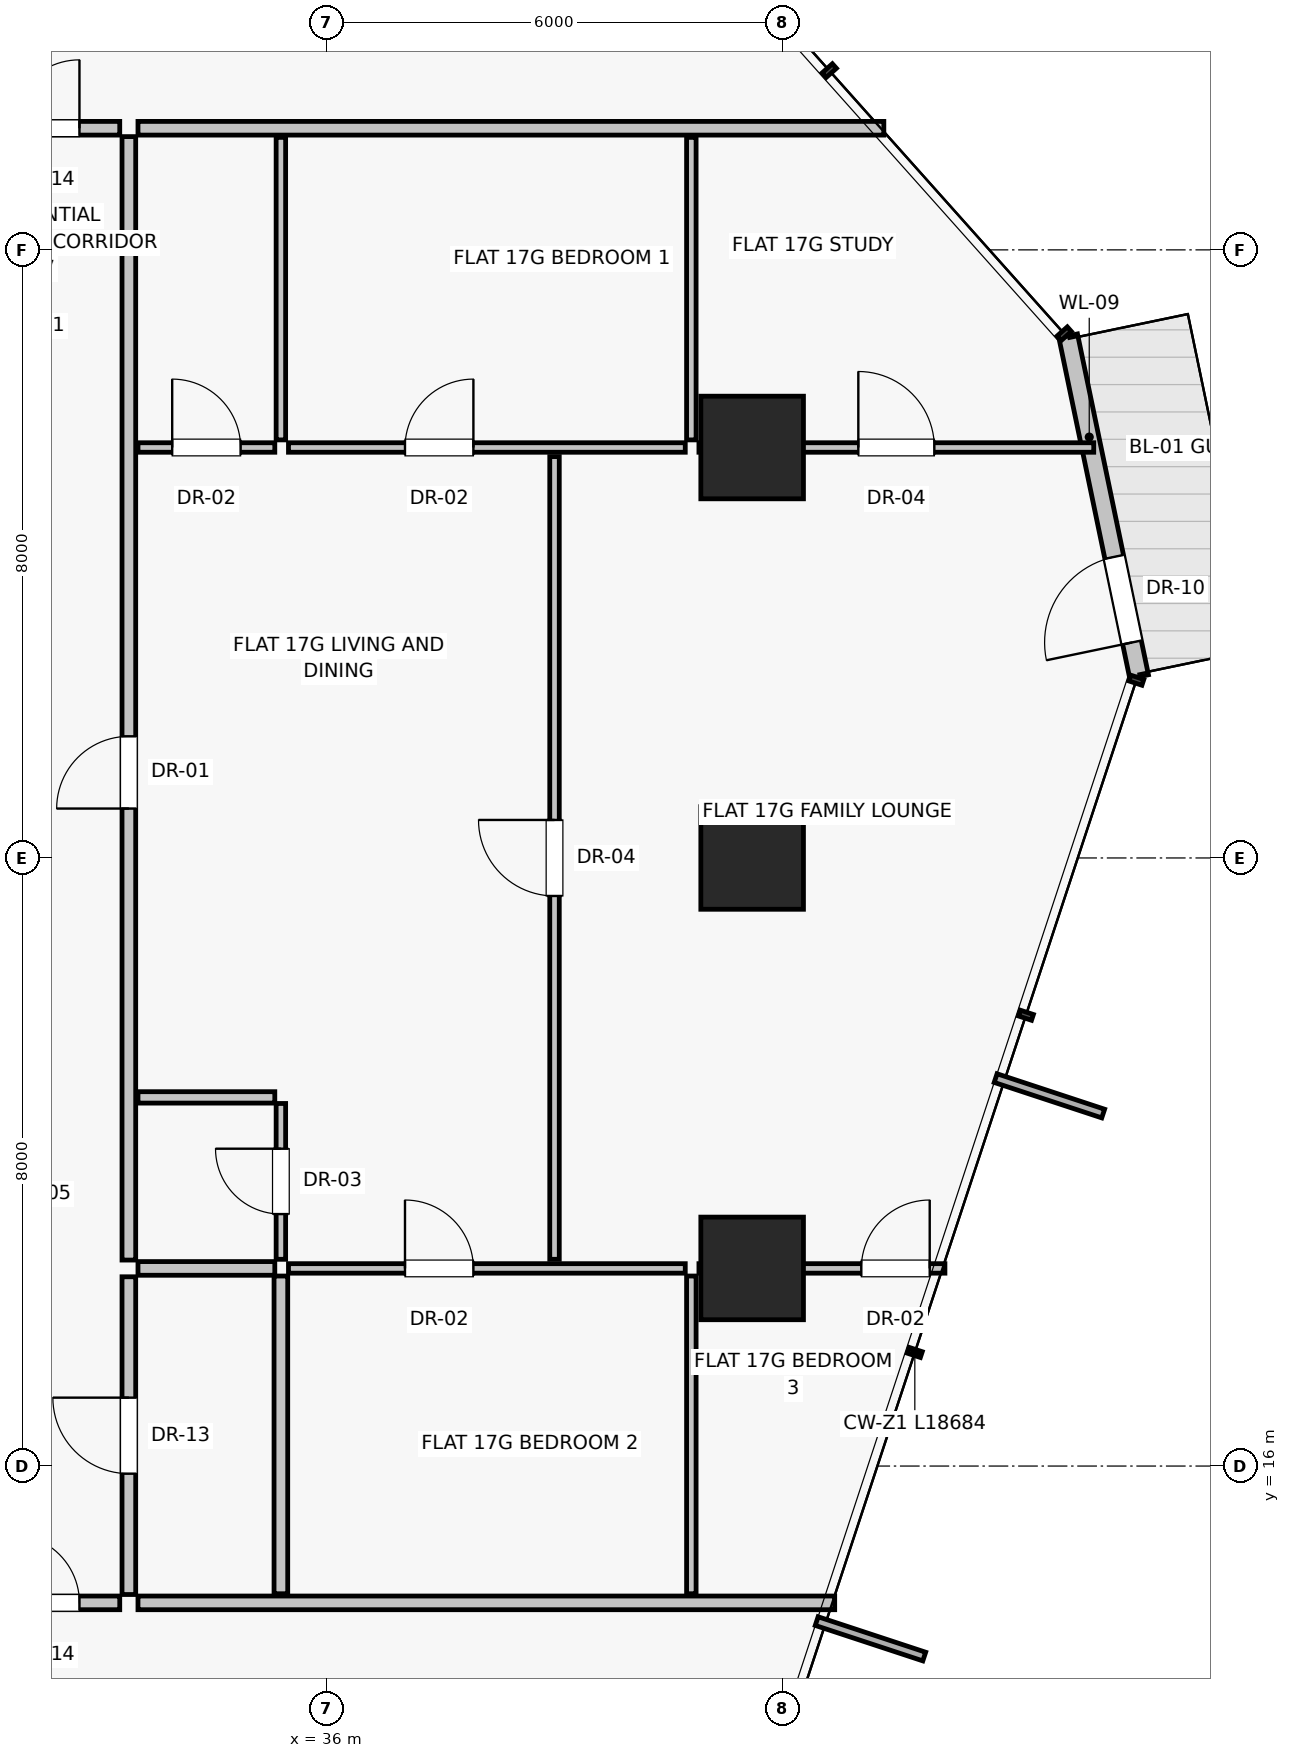
"""IFC4 building model, lengths in metres.
Left out: names, types, materials, properties, quantities, classifications, styles, units other than length and angle.
Written with IfcOpenShell. Run it as: python <this file> out.ifc"""

import sys

from ifc_helpers import new_model, si_unit, direction, frame, frame_2d, origin, origin_2d, place, context, subcontext, project, spatial, rectangle, extrude, source, transform, mapped, element, fill, save


model = new_model("IFC4")
c1 = context("Model", 3, precision=1e-05, world=origin(), true_north=direction((0.0, 1.0)))
c2 = subcontext(c1, "Body", "Model", "MODEL_VIEW")
j1 = project(units=[si_unit("LENGTHUNIT", "METRE"), si_unit("PLANEANGLEUNIT", "RADIAN")], contexts=[c1])
p1 = place(None, origin())
s1 = spatial("IfcSite", under=j1, at=p1, CompositionType="ELEMENT")
p2 = place(p1, origin())
s2 = spatial("IfcBuilding", under=s1, at=p2, CompositionType="ELEMENT")
p3 = place(p2, frame((0.0, 0.0, 64.1)))
s3 = spatial("IfcBuildingStorey", under=s2, at=p3, CompositionType="ELEMENT", Elevation=64.1)
for number, where, z_axis, x_axis in (
    (1, (41.6, 18.6, 0.0), (0.0, 0.0, 1.0), (1.0, 0.0, 0.0)),
    (2, (41.6, 24.0, 0.0), (0.0, 0.0, 1.0), (1.0, 0.0, 0.0)),
    (3, (41.6, 29.4, 0.0), (0.0, 0.0, 1.0), (1.0, 0.0, 0.0)),
):
    element("IfcColumn", number, at=place(p3, frame(where, z_axis=z_axis, x_axis=x_axis)), inside=s3, PredefinedType="COLUMN", context=c2, shape_type="SweptSolid", body=[
        extrude(rectangle(XDim=1.35, YDim=1.35, at=origin_2d()), origin(), (0.0, 0.0, 1.0), 3.25),
    ])
p4 = place(p3, frame((46.691, 26.385, 0.0), z_axis=(0.0, 0.0, 1.0), x_axis=(-0.203788213697, 0.979014996799, 0.0)))
e4 = element("IfcWall", 4, at=p4, inside=s3, PredefinedType="SOLIDWALL", context=c2, shape_type="SweptSolid", body=[
    extrude(rectangle(XDim=4.58, YDim=0.25, at=frame_2d((2.29, 0.0))), origin(), (0.0, 0.0, 1.0), 3.0),
])
p5 = place(p4, frame((0.46, 0.0, 0.0)))
e5 = element("IfcOpeningElement", 5, at=p5, cuts=e4, PredefinedType="OPENING", context=c2, shape_type="SweptSolid", body=[
    extrude(rectangle(XDim=1.15, YDim=2.25, at=frame_2d((0.575, 1.125))), frame((0.0, 0.135, 0.0), z_axis=(0.0, -1.0, 0.0), x_axis=(1.0, 0.0, 0.0)), (0.0, 0.0, 1.0), 0.27),
])
p6 = place(p3, frame((33.52, 14.2, 0.0), z_axis=(0.0, 0.0, 1.0), x_axis=(1.0, 0.0, 0.0)))
e6 = element("IfcWall", 6, at=p6, inside=s3, PredefinedType="PARTITIONING", context=c2, shape_type="SweptSolid", body=[
    extrude(rectangle(XDim=9.166, YDim=0.18, at=frame_2d((4.583, 0.0))), origin(), (0.0, 0.0, 1.0), 3.0),
])
p7 = place(p3, frame((33.52, 33.6, 0.0), z_axis=(0.0, 0.0, 1.0), x_axis=(1.0, 0.0, 0.0)))
e7 = element("IfcWall", 7, at=p7, inside=s3, PredefinedType="PARTITIONING", context=c2, shape_type="SweptSolid", body=[
    extrude(rectangle(XDim=9.812, YDim=0.18, at=frame_2d((4.906, 0.0))), origin(), (0.0, 0.0, 1.0), 3.0),
])
p8 = place(p3, frame((33.4, 14.31, 0.0), z_axis=(0.0, 0.0, 1.0), x_axis=(0.0, 1.0, 0.0)))
e8 = element("IfcWall", 8, at=p8, inside=s3, PredefinedType="PARTITIONING", context=c2, shape_type="SweptSolid", body=[
    extrude(rectangle(XDim=4.18, YDim=0.18, at=frame_2d((2.09, 0.0))), origin(), (0.0, 0.0, 1.0), 3.0),
])
p9 = place(p8, frame((1.59, 0.0, 0.0)))
e9 = element("IfcOpeningElement", 9, at=p9, cuts=e8, PredefinedType="OPENING", context=c2, shape_type="SweptSolid", body=[
    extrude(rectangle(XDim=1.0, YDim=2.01, at=frame_2d((0.5, 1.005))), frame((0.0, 0.1, 0.0), z_axis=(0.0, -1.0, 0.0), x_axis=(1.0, 0.0, 0.0)), (0.0, 0.0, 1.0), 0.2),
])
p10 = place(p3, frame((33.4, 18.71, 0.0), z_axis=(0.0, 0.0, 1.0), x_axis=(0.0, 1.0, 0.0)))
e10 = element("IfcWall", 10, at=p10, inside=s3, PredefinedType="PARTITIONING", context=c2, shape_type="SweptSolid", body=[
    extrude(rectangle(XDim=14.78, YDim=0.18, at=frame_2d((7.39, 0.0))), origin(), (0.0, 0.0, 1.0), 3.0),
])
p11 = place(p10, frame((5.94, 0.0, 0.0)))
e11 = element("IfcOpeningElement", 11, at=p11, cuts=e10, PredefinedType="OPENING", context=c2, shape_type="SweptSolid", body=[
    extrude(rectangle(XDim=0.95, YDim=2.02, at=frame_2d((0.475, 1.01))), frame((0.0, 0.1, 0.0), z_axis=(0.0, -1.0, 0.0), x_axis=(1.0, 0.0, 0.0)), (0.0, 0.0, 1.0), 0.2),
])
p12 = place(p3, frame((40.8, 14.32, 0.0), z_axis=(0.0, 0.0, 1.0), x_axis=(0.0, 1.0, 0.0)))
e12 = element("IfcWall", 12, at=p12, inside=s3, PredefinedType="PARTITIONING", context=c2, shape_type="SweptSolid", body=[
    extrude(rectangle(XDim=4.18, YDim=0.125, at=frame_2d((2.09, 0.0))), origin(), (0.0, 0.0, 1.0), 3.0),
])
p13 = place(p3, frame((40.9, 18.6, 0.0), z_axis=(0.0, 0.0, 1.0), x_axis=(1.0, 0.0, 0.0)))
e13 = element("IfcWall", 13, at=p13, inside=s3, PredefinedType="PARTITIONING", context=c2, shape_type="SweptSolid", body=[
    extrude(rectangle(XDim=3.236, YDim=0.125, at=frame_2d((1.618, 0.0))), origin(), (0.0, 0.0, 1.0), 2.299),
])
p14 = place(p13, frame((2.136, 0.0, 0.0)))
e14 = element("IfcOpeningElement", 14, at=p14, cuts=e13, PredefinedType="OPENING", context=c2, shape_type="SweptSolid", body=[
    extrude(rectangle(XDim=0.9, YDim=2.01, at=frame_2d((0.45, 1.005))), frame((0.0, 0.073, 0.0), z_axis=(0.0, -1.0, 0.0), x_axis=(1.0, 0.0, 0.0)), (0.0, 0.0, 1.0), 0.145),
])
p15 = place(p3, frame((40.8, 29.5, 0.0), z_axis=(0.0, 0.0, 1.0), x_axis=(0.0, 1.0, 0.0)))
e15 = element("IfcWall", 15, at=p15, inside=s3, PredefinedType="PARTITIONING", context=c2, shape_type="SweptSolid", body=[
    extrude(rectangle(XDim=3.98, YDim=0.125, at=frame_2d((1.99, 0.0))), origin(), (0.0, 0.0, 1.0), 3.0),
])
p16 = place(p3, frame((40.9, 29.4, 0.0), z_axis=(0.0, 0.0, 1.0), x_axis=(1.0, 0.0, 0.0)))
e16 = element("IfcWall", 16, at=p16, inside=s3, PredefinedType="PARTITIONING", context=c2, shape_type="SweptSolid", body=[
    extrude(rectangle(XDim=5.194, YDim=0.125, at=frame_2d((2.597, 0.0))), origin(), (0.0, 0.0, 1.0), 2.299),
])
p17 = place(p16, frame((2.097, 0.0, 0.0)))
e17 = element("IfcOpeningElement", 17, at=p17, cuts=e16, PredefinedType="OPENING", context=c2, shape_type="SweptSolid", body=[
    extrude(rectangle(XDim=1.0, YDim=2.01, at=frame_2d((0.5, 1.005))), frame((0.0, 0.073, 0.0), z_axis=(0.0, -1.0, 0.0), x_axis=(1.0, 0.0, 0.0)), (0.0, 0.0, 1.0), 0.145),
])
p18 = place(p3, frame((39.0, 18.72, 0.0), z_axis=(0.0, 0.0, 1.0), x_axis=(0.0, 1.0, 0.0)))
e18 = element("IfcWall", 18, at=p18, inside=s3, PredefinedType="PARTITIONING", context=c2, shape_type="SweptSolid", body=[
    extrude(rectangle(XDim=10.56, YDim=0.125, at=frame_2d((5.28, 0.0))), origin(), (0.0, 0.0, 1.0), 3.0),
])
p19 = place(p18, frame((4.78, 0.0, 0.0)))
e19 = element("IfcOpeningElement", 19, at=p19, cuts=e18, PredefinedType="OPENING", context=c2, shape_type="SweptSolid", body=[
    extrude(rectangle(XDim=1.0, YDim=2.01, at=frame_2d((0.5, 1.005))), frame((0.0, 0.073, 0.0), z_axis=(0.0, -1.0, 0.0), x_axis=(1.0, 0.0, 0.0)), (0.0, 0.0, 1.0), 0.145),
])
p20 = place(p3, frame((35.4, 14.32, 0.0), z_axis=(0.0, 0.0, 1.0), x_axis=(0.0, 1.0, 0.0)))
e20 = element("IfcWall", 20, at=p20, inside=s3, PredefinedType="PARTITIONING", context=c2, shape_type="SweptSolid", body=[
    extrude(rectangle(XDim=4.18, YDim=0.18, at=frame_2d((2.09, 0.0))), origin(), (0.0, 0.0, 1.0), 3.0),
])
p21 = place(p3, frame((33.52, 18.6, 0.0), z_axis=(0.0, 0.0, 1.0), x_axis=(1.0, 0.0, 0.0)))
e21 = element("IfcWall", 21, at=p21, inside=s3, PredefinedType="PARTITIONING", context=c2, shape_type="SweptSolid", body=[
    extrude(rectangle(XDim=1.8, YDim=0.18, at=frame_2d((0.9, 0.0))), origin(), (0.0, 0.0, 1.0), 3.0),
])
p22 = place(p3, frame((35.5, 18.6, 0.0), z_axis=(0.0, 0.0, 1.0), x_axis=(1.0, 0.0, 0.0)))
e22 = element("IfcWall", 22, at=p22, inside=s3, PredefinedType="PARTITIONING", context=c2, shape_type="SweptSolid", body=[
    extrude(rectangle(XDim=5.22, YDim=0.125, at=frame_2d((2.61, 0.0))), origin(), (0.0, 0.0, 1.0), 2.299),
])
p23 = place(p22, frame((1.533, 0.0, 0.0)))
e23 = element("IfcOpeningElement", 23, at=p23, cuts=e22, PredefinedType="OPENING", context=c2, shape_type="SweptSolid", body=[
    extrude(rectangle(XDim=0.9, YDim=2.01, at=frame_2d((0.45, 1.005))), frame((0.0, 0.073, 0.0), z_axis=(0.0, -1.0, 0.0), x_axis=(1.0, 0.0, 0.0)), (0.0, 0.0, 1.0), 0.145),
])
p24 = place(p3, frame((33.52, 20.85, 0.0), z_axis=(0.0, 0.0, 1.0), x_axis=(1.0, 0.0, 0.0)))
e24 = element("IfcWall", 24, at=p24, inside=s3, PredefinedType="PARTITIONING", context=c2, shape_type="SweptSolid", body=[
    extrude(rectangle(XDim=1.8, YDim=0.15, at=frame_2d((0.9, 0.0))), origin(), (0.0, 0.0, 1.0), 3.0),
])
p25 = place(p3, frame((35.4, 18.72, 0.0), z_axis=(0.0, 0.0, 1.0), x_axis=(0.0, 1.0, 0.0)))
e25 = element("IfcWall", 25, at=p25, inside=s3, PredefinedType="PARTITIONING", context=c2, shape_type="SweptSolid", body=[
    extrude(rectangle(XDim=2.05, YDim=0.125, at=frame_2d((1.025, 0.0))), origin(), (0.0, 0.0, 1.0), 3.0),
])
p26 = place(p25, frame((0.595, 0.0, 0.0)))
e26 = element("IfcOpeningElement", 26, at=p26, cuts=e25, PredefinedType="OPENING", context=c2, shape_type="SweptSolid", body=[
    extrude(rectangle(XDim=0.86, YDim=2.01, at=frame_2d((0.43, 1.005))), frame((0.0, 0.073, 0.0), z_axis=(0.0, -1.0, 0.0), x_axis=(1.0, 0.0, 0.0)), (0.0, 0.0, 1.0), 0.145),
])
p27 = place(p3, frame((33.52, 29.4, 0.0), z_axis=(0.0, 0.0, 1.0), x_axis=(1.0, 0.0, 0.0)))
e27 = element("IfcWall", 27, at=p27, inside=s3, PredefinedType="PARTITIONING", context=c2, shape_type="SweptSolid", body=[
    extrude(rectangle(XDim=1.8, YDim=0.125, at=frame_2d((0.9, 0.0))), origin(), (0.0, 0.0, 1.0), 3.0),
])
p28 = place(p27, frame((0.45, 0.0, 0.0)))
e28 = element("IfcOpeningElement", 28, at=p28, cuts=e27, PredefinedType="OPENING", context=c2, shape_type="SweptSolid", body=[
    extrude(rectangle(XDim=0.9, YDim=2.01, at=frame_2d((0.45, 1.005))), frame((0.0, 0.073, 0.0), z_axis=(0.0, -1.0, 0.0), x_axis=(1.0, 0.0, 0.0)), (0.0, 0.0, 1.0), 0.145),
])
p29 = place(p3, frame((35.4, 29.5, 0.0), z_axis=(0.0, 0.0, 1.0), x_axis=(0.0, 1.0, 0.0)))
e29 = element("IfcWall", 29, at=p29, inside=s3, PredefinedType="PARTITIONING", context=c2, shape_type="SweptSolid", body=[
    extrude(rectangle(XDim=3.98, YDim=0.125, at=frame_2d((1.99, 0.0))), origin(), (0.0, 0.0, 1.0), 3.0),
])
p30 = place(p3, frame((35.5, 29.4, 0.0), z_axis=(0.0, 0.0, 1.0), x_axis=(1.0, 0.0, 0.0)))
e30 = element("IfcWall", 30, at=p30, inside=s3, PredefinedType="PARTITIONING", context=c2, shape_type="SweptSolid", body=[
    extrude(rectangle(XDim=5.22, YDim=0.125, at=frame_2d((2.61, 0.0))), origin(), (0.0, 0.0, 1.0), 2.299),
])
p31 = place(p30, frame((1.533, 0.0, 0.0)))
e31 = element("IfcOpeningElement", 31, at=p31, cuts=e30, PredefinedType="OPENING", context=c2, shape_type="SweptSolid", body=[
    extrude(rectangle(XDim=0.9, YDim=2.01, at=frame_2d((0.45, 1.005))), frame((0.0, 0.073, 0.0), z_axis=(0.0, -1.0, 0.0), x_axis=(1.0, 0.0, 0.0)), (0.0, 0.0, 1.0), 0.145),
])
p32 = place(p3, frame((31.32, 14.2, 0.0), z_axis=(0.0, 0.0, 1.0), x_axis=(1.0, 0.0, 0.0)))
e32 = element("IfcWall", 32, at=p32, inside=s3, PredefinedType="PARTITIONING", context=c2, shape_type="SweptSolid", body=[
    extrude(rectangle(XDim=1.96, YDim=0.18, at=frame_2d((0.98, 0.0))), origin(), (0.0, 0.0, 1.0), 3.0),
])
p33 = place(p32, frame((0.53, 0.0, 0.0)))
e33 = element("IfcOpeningElement", 33, at=p33, cuts=e32, PredefinedType="OPENING", context=c2, shape_type="SweptSolid", body=[
    extrude(rectangle(XDim=0.9, YDim=2.01, at=frame_2d((0.45, 1.005))), frame((0.0, 0.1, 0.0), z_axis=(0.0, -1.0, 0.0), x_axis=(1.0, 0.0, 0.0)), (0.0, 0.0, 1.0), 0.2),
])
p34 = place(p3, frame((31.32, 33.6, 0.0), z_axis=(0.0, 0.0, 1.0), x_axis=(1.0, 0.0, 0.0)))
e34 = element("IfcWall", 34, at=p34, inside=s3, PredefinedType="PARTITIONING", context=c2, shape_type="SweptSolid", body=[
    extrude(rectangle(XDim=1.96, YDim=0.18, at=frame_2d((0.98, 0.0))), origin(), (0.0, 0.0, 1.0), 3.0),
])
p35 = place(p34, frame((0.53, 0.0, 0.0)))
e35 = element("IfcOpeningElement", 35, at=p35, cuts=e34, PredefinedType="OPENING", context=c2, shape_type="SweptSolid", body=[
    extrude(rectangle(XDim=0.9, YDim=2.01, at=frame_2d((0.45, 1.005))), frame((0.0, 0.1, 0.0), z_axis=(0.0, -1.0, 0.0), x_axis=(1.0, 0.0, 0.0)), (0.0, 0.0, 1.0), 0.2),
])
m1 = source(origin(), c2, "Body", "SweptSolid", [
    extrude(rectangle(XDim=1.15, YDim=2.25, at=frame_2d((0.575, 1.125))), frame((0.0, 0.025, 0.0), z_axis=(0.0, -1.0, 0.0), x_axis=(1.0, 0.0, 0.0)), (0.0, 0.0, 1.0), 0.05),
])
p36 = place(p5, frame((1.15, 0.0, 0.0), z_axis=(0.0, 0.0, 1.0), x_axis=(-1.0, 0.0, 0.0)))
e36 = element("IfcDoor", 36, at=p36, inside=s3, OperationType="SINGLE_SWING_LEFT", PredefinedType="DOOR", context=c2, shape_type="MappedRepresentation", body=[
    mapped(m1, transform((0.0, 0.0, 0.0), scale=1.0)),
])
fill(e5, e36)
m2 = source(origin(), c2, "Body", "SweptSolid", [
    extrude(rectangle(XDim=1.0, YDim=2.01, at=frame_2d((0.5, 1.005))), frame((0.0, 0.025, 0.0), z_axis=(0.0, -1.0, 0.0), x_axis=(1.0, 0.0, 0.0)), (0.0, 0.0, 1.0), 0.05),
])
p37 = place(p9, origin())
e37 = element("IfcDoor", 37, at=p37, inside=s3, OperationType="SINGLE_SWING_RIGHT", PredefinedType="DOOR", context=c2, shape_type="MappedRepresentation", body=[
    mapped(m2, transform((0.0, 0.0, 0.0), scale=1.0)),
])
fill(e9, e37)
m3 = source(origin(), c2, "Body", "SweptSolid", [
    extrude(rectangle(XDim=0.95, YDim=2.02, at=frame_2d((0.475, 1.01))), frame((0.0, 0.025, 0.0), z_axis=(0.0, -1.0, 0.0), x_axis=(1.0, 0.0, 0.0)), (0.0, 0.0, 1.0), 0.05),
])
p38 = place(p11, origin())
e38 = element("IfcDoor", 38, at=p38, inside=s3, OperationType="SINGLE_SWING_LEFT", PredefinedType="DOOR", context=c2, shape_type="MappedRepresentation", body=[
    mapped(m3, transform((0.0, 0.0, 0.0), scale=1.0)),
])
fill(e11, e38)
m4 = source(origin(), c2, "Body", "SweptSolid", [
    extrude(rectangle(XDim=0.9, YDim=2.01, at=frame_2d((0.45, 1.005))), frame((0.0, 0.025, 0.0), z_axis=(0.0, -1.0, 0.0), x_axis=(1.0, 0.0, 0.0)), (0.0, 0.0, 1.0), 0.05),
])
p39 = place(p14, origin())
e39 = element("IfcDoor", 39, at=p39, inside=s3, OperationType="SINGLE_SWING_RIGHT", PredefinedType="DOOR", context=c2, shape_type="MappedRepresentation", body=[
    mapped(m4, transform((0.0, 0.0, 0.0), scale=1.0)),
])
fill(e14, e39)
p40 = place(p17, origin())
e40 = element("IfcDoor", 40, at=p40, inside=s3, OperationType="SINGLE_SWING_LEFT", PredefinedType="DOOR", context=c2, shape_type="MappedRepresentation", body=[
    mapped(m2, transform((0.0, 0.0, 0.0), scale=1.0)),
])
fill(e17, e40)
p41 = place(p19, origin())
e41 = element("IfcDoor", 41, at=p41, inside=s3, OperationType="SINGLE_SWING_RIGHT", PredefinedType="DOOR", context=c2, shape_type="MappedRepresentation", body=[
    mapped(m2, transform((0.0, 0.0, 0.0), scale=1.0)),
])
fill(e19, e41)
p42 = place(p23, origin())
e42 = element("IfcDoor", 42, at=p42, inside=s3, OperationType="SINGLE_SWING_LEFT", PredefinedType="DOOR", context=c2, shape_type="MappedRepresentation", body=[
    mapped(m4, transform((0.0, 0.0, 0.0), scale=1.0)),
])
fill(e23, e42)
m5 = source(origin(), c2, "Body", "SweptSolid", [
    extrude(rectangle(XDim=0.86, YDim=2.01, at=frame_2d((0.43, 1.005))), frame((0.0, 0.025, 0.0), z_axis=(0.0, -1.0, 0.0), x_axis=(1.0, 0.0, 0.0)), (0.0, 0.0, 1.0), 0.05),
])
p43 = place(p26, origin())
e43 = element("IfcDoor", 43, at=p43, inside=s3, OperationType="SINGLE_SWING_RIGHT", PredefinedType="DOOR", context=c2, shape_type="MappedRepresentation", body=[
    mapped(m5, transform((0.0, 0.0, 0.0), scale=1.0)),
])
fill(e26, e43)
p44 = place(p28, origin())
e44 = element("IfcDoor", 44, at=p44, inside=s3, OperationType="SINGLE_SWING_LEFT", PredefinedType="DOOR", context=c2, shape_type="MappedRepresentation", body=[
    mapped(m4, transform((0.0, 0.0, 0.0), scale=1.0)),
])
fill(e28, e44)
p45 = place(p31, origin())
e45 = element("IfcDoor", 45, at=p45, inside=s3, OperationType="SINGLE_SWING_RIGHT", PredefinedType="DOOR", context=c2, shape_type="MappedRepresentation", body=[
    mapped(m4, transform((0.0, 0.0, 0.0), scale=1.0)),
])
fill(e31, e45)
p46 = place(p33, origin())
e46 = element("IfcDoor", 46, at=p46, inside=s3, OperationType="SINGLE_SWING_LEFT", PredefinedType="DOOR", context=c2, shape_type="MappedRepresentation", body=[
    mapped(m4, transform((0.0, 0.0, 0.0), scale=1.0)),
])
fill(e33, e46)
p47 = place(p35, origin())
e47 = element("IfcDoor", 47, at=p47, inside=s3, OperationType="SINGLE_SWING_RIGHT", PredefinedType="DOOR", context=c2, shape_type="MappedRepresentation", body=[
    mapped(m4, transform((0.0, 0.0, 0.0), scale=1.0)),
])
fill(e35, e47)
save(model, sys.argv[1])
